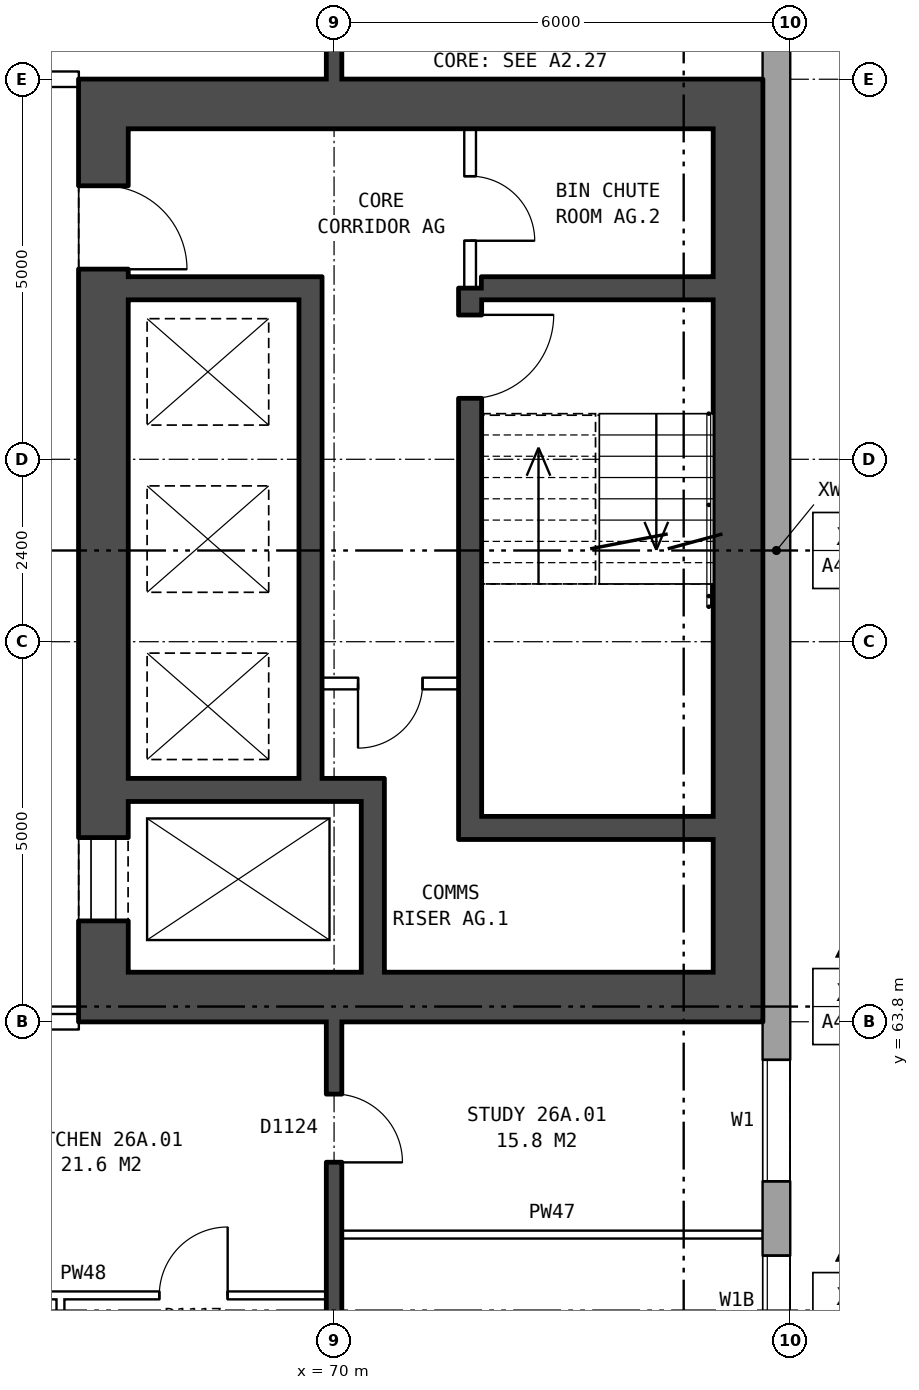
"""IFC4 building model, lengths in metres.
Left out: names, types, materials, properties, quantities, classifications, styles, units other than length and angle.
Written with IfcOpenShell. Run it as: python <this file> out.ifc"""

import sys

from ifc_helpers import new_model, si_unit, direction, frame, frame_2d, origin, place, context, subcontext, project, spatial, rectangle, extrude, element, fill, save


model = new_model("IFC4")
c1 = context("Model", 3, precision=1e-05, world=origin(), true_north=direction((0.0, 1.0)))
c2 = subcontext(c1, "Body", "Model", "MODEL_VIEW")
j1 = project(units=[si_unit("LENGTHUNIT", "METRE"), si_unit("PLANEANGLEUNIT", "RADIAN")], contexts=[c1])
p1 = place(None, origin())
s1 = spatial("IfcSite", under=j1, at=p1, CompositionType="ELEMENT")
p2 = place(p1, origin())
s2 = spatial("IfcBuilding", under=s1, at=p2, CompositionType="ELEMENT")
p3 = place(p2, frame((0.0, 0.0, 96.4)))
s3 = spatial("IfcBuildingStorey", under=s2, at=p3, CompositionType="ELEMENT", Elevation=96.4)
p4 = place(p3, frame((75.82, 57.075, 0.0), z_axis=(0.0, 0.0, 1.0), x_axis=(0.0, 1.0, 0.0)))
e1 = element("IfcWall", 1, at=p4, inside=s3, PredefinedType="STANDARD", context=c2, shape_type="SweptSolid", body=[
    extrude(rectangle(XDim=25.851, YDim=0.36, at=frame_2d((12.925, 0.0))), origin(), (0.0, 0.0, 1.0), 2.85),
])
p5 = place(p4, frame((0.9, 0.0, 0.8)))
e2 = element("IfcOpeningElement", 2, at=p5, cuts=e1, PredefinedType="OPENING", context=c2, shape_type="SweptSolid", body=[
    extrude(rectangle(XDim=1.2, YDim=0.9, at=frame_2d((0.6, 0.45))), frame((0.0, 0.19, 0.0), z_axis=(0.0, -1.0, 0.0), x_axis=(1.0, 0.0, 0.0)), (0.0, 0.0, 1.0), 0.38),
])
p6 = place(p4, frame((4.625, 0.0, 0.8)))
e3 = element("IfcOpeningElement", 3, at=p6, cuts=e1, PredefinedType="OPENING", context=c2, shape_type="SweptSolid", body=[
    extrude(rectangle(XDim=1.6, YDim=1.8, at=frame_2d((0.8, 0.9))), frame((0.0, 0.19, 0.0), z_axis=(0.0, -1.0, 0.0), x_axis=(1.0, 0.0, 0.0)), (0.0, 0.0, 1.0), 0.38),
])
p7 = place(p4, frame((19.625, 0.0, 0.8)))
e4 = element("IfcOpeningElement", 4, at=p7, cuts=e1, PredefinedType="OPENING", context=c2, shape_type="SweptSolid", body=[
    extrude(rectangle(XDim=1.6, YDim=1.8, at=frame_2d((0.8, 0.9))), frame((0.0, 0.19, 0.0), z_axis=(0.0, -1.0, 0.0), x_axis=(1.0, 0.0, 0.0)), (0.0, 0.0, 1.0), 0.38),
])
p8 = place(p4, frame((21.525, 0.0, 0.8)))
e5 = element("IfcOpeningElement", 5, at=p8, cuts=e1, PredefinedType="OPENING", context=c2, shape_type="SweptSolid", body=[
    extrude(rectangle(XDim=1.4, YDim=1.8, at=frame_2d((0.7, 0.9))), frame((0.0, 0.19, 0.0), z_axis=(0.0, -1.0, 0.0), x_axis=(1.0, 0.0, 0.0)), (0.0, 0.0, 1.0), 0.38),
])
p9 = place(p4, frame((2.45, 0.0, 0.8)))
e6 = element("IfcOpeningElement", 6, at=p9, cuts=e1, PredefinedType="OPENING", context=c2, shape_type="SweptSolid", body=[
    extrude(rectangle(XDim=1.2, YDim=1.8, at=frame_2d((0.6, 0.9))), frame((0.0, 0.19, 0.0), z_axis=(0.0, -1.0, 0.0), x_axis=(1.0, 0.0, 0.0)), (0.0, 0.0, 1.0), 0.38),
])
p10 = place(p4, frame((23.225, 0.0, 0.8)))
e7 = element("IfcOpeningElement", 7, at=p10, cuts=e1, PredefinedType="OPENING", context=c2, shape_type="SweptSolid", body=[
    extrude(rectangle(XDim=1.0, YDim=1.2, at=frame_2d((0.5, 0.6))), frame((0.0, 0.19, 0.0), z_axis=(0.0, -1.0, 0.0), x_axis=(1.0, 0.0, 0.0)), (0.0, 0.0, 1.0), 0.38),
])
p11 = place(p3, frame((66.965, 64.45, 0.0), z_axis=(0.0, 0.0, 1.0), x_axis=(0.0, 1.0, 0.0)))
e8 = element("IfcWall", 8, at=p11, inside=s3, PredefinedType="SHEAR", context=c2, shape_type="SweptSolid", body=[
    extrude(rectangle(XDim=11.1, YDim=0.65, at=frame_2d((5.55, 0.0))), origin(), (0.0, 0.0, 1.0), 2.85),
])
p12 = place(p11, frame((0.675, 0.0, 0.0)))
e9 = element("IfcOpeningElement", 9, at=p12, cuts=e8, PredefinedType="OPENING", context=c2, shape_type="SweptSolid", body=[
    extrude(rectangle(XDim=1.1, YDim=2.1, at=frame_2d((0.55, 1.05))), frame((0.0, 0.335, 0.0), z_axis=(0.0, -1.0, 0.0), x_axis=(1.0, 0.0, 0.0)), (0.0, 0.0, 1.0), 0.67),
])
p13 = place(p11, frame((9.25, 0.0, 0.0)))
e10 = element("IfcOpeningElement", 10, at=p13, cuts=e8, PredefinedType="OPENING", context=c2, shape_type="SweptSolid", body=[
    extrude(rectangle(XDim=1.1, YDim=2.1, at=frame_2d((0.55, 1.05))), frame((0.0, 0.335, 0.0), z_axis=(0.0, -1.0, 0.0), x_axis=(1.0, 0.0, 0.0)), (0.0, 0.0, 1.0), 0.67),
])
p14 = place(p3, frame((75.315, 64.45, 0.0), z_axis=(0.0, 0.0, 1.0), x_axis=(0.0, 1.0, 0.0)))
e11 = element("IfcWall", 11, at=p14, inside=s3, PredefinedType="SHEAR", context=c2, shape_type="SweptSolid", body=[
    extrude(rectangle(XDim=11.1, YDim=0.65, at=frame_2d((5.55, 0.0))), origin(), (0.0, 0.0, 1.0), 2.85),
])
for number, where, z_axis, x_axis in (
    (12, (66.64, 64.125, 0.0), (0.0, 0.0, 1.0), (1.0, 0.0, 0.0)),
    (13, (66.64, 75.875, 0.0), (0.0, 0.0, 1.0), (1.0, 0.0, 0.0)),
):
    element("IfcWall", number, at=place(p3, frame(where, z_axis=z_axis, x_axis=x_axis)), inside=s3, PredefinedType="SHEAR", context=c2, shape_type="SweptSolid", body=[
        extrude(rectangle(XDim=9.0, YDim=0.65, at=frame_2d((4.5, 0.0))), origin(), (0.0, 0.0, 1.0), 2.85),
    ])
p15 = place(p3, frame((71.94, 66.35, 0.0), z_axis=(0.0, 0.0, 1.0), x_axis=(1.0, 0.0, 0.0)))
e14 = element("IfcWall", 14, at=p15, inside=s3, PredefinedType="SHEAR", context=c2, shape_type="SweptSolid", body=[
    extrude(rectangle(XDim=3.05, YDim=0.3, at=frame_2d((1.525, 0.0))), origin(), (0.0, 0.0, 1.0), 2.85),
])
p16 = place(p3, frame((67.29, 66.85, 0.0), z_axis=(0.0, 0.0, 1.0), x_axis=(1.0, 0.0, 0.0)))
e15 = element("IfcWall", 15, at=p16, inside=s3, PredefinedType="SHEAR", context=c2, shape_type="SweptSolid", body=[
    extrude(rectangle(XDim=3.37, YDim=0.3, at=frame_2d((1.685, 0.0))), origin(), (0.0, 0.0, 1.0), 2.85),
])
p17 = place(p3, frame((69.84, 68.25, 0.0), z_axis=(0.0, 0.0, 1.0), x_axis=(1.0, 0.0, 0.0)))
e16 = element("IfcWall", 16, at=p17, inside=s3, PredefinedType="PARTITIONING", context=c2, shape_type="SweptSolid", body=[
    extrude(rectangle(XDim=1.8, YDim=0.15, at=frame_2d((0.9, 0.0))), origin(), (0.0, 0.0, 1.0), 2.85),
])
p18 = place(p17, frame((0.475, 0.0, 0.0)))
e17 = element("IfcOpeningElement", 17, at=p18, cuts=e16, PredefinedType="OPENING", context=c2, shape_type="SweptSolid", body=[
    extrude(rectangle(XDim=0.85, YDim=2.1, at=frame_2d((0.425, 1.05))), frame((0.0, 0.085, 0.0), z_axis=(0.0, -1.0, 0.0), x_axis=(1.0, 0.0, 0.0)), (0.0, 0.0, 1.0), 0.17),
])
p19 = place(p3, frame((67.29, 73.45, 0.0), z_axis=(0.0, 0.0, 1.0), x_axis=(1.0, 0.0, 0.0)))
e18 = element("IfcWall", 18, at=p19, inside=s3, PredefinedType="SHEAR", context=c2, shape_type="SweptSolid", body=[
    extrude(rectangle(XDim=2.25, YDim=0.3, at=frame_2d((1.125, 0.0))), origin(), (0.0, 0.0, 1.0), 2.85),
])
p20 = place(p3, frame((71.94, 73.45, 0.0), z_axis=(0.0, 0.0, 1.0), x_axis=(1.0, 0.0, 0.0)))
e19 = element("IfcWall", 19, at=p20, inside=s3, PredefinedType="SHEAR", context=c2, shape_type="SweptSolid", body=[
    extrude(rectangle(XDim=3.05, YDim=0.3, at=frame_2d((1.525, 0.0))), origin(), (0.0, 0.0, 1.0), 2.85),
])
p21 = place(p3, frame((69.69, 67.0, 0.0), z_axis=(0.0, 0.0, 1.0), x_axis=(0.0, 1.0, 0.0)))
e20 = element("IfcWall", 20, at=p21, inside=s3, PredefinedType="SHEAR", context=c2, shape_type="SweptSolid", body=[
    extrude(rectangle(XDim=6.6, YDim=0.3, at=frame_2d((3.3, 0.0))), origin(), (0.0, 0.0, 1.0), 2.85),
])
p22 = place(p3, frame((70.51, 64.45, 0.0), z_axis=(0.0, 0.0, 1.0), x_axis=(0.0, 1.0, 0.0)))
e21 = element("IfcWall", 21, at=p22, inside=s3, PredefinedType="SHEAR", context=c2, shape_type="SweptSolid", body=[
    extrude(rectangle(XDim=2.25, YDim=0.3, at=frame_2d((1.125, 0.0))), origin(), (0.0, 0.0, 1.0), 2.85),
])
p23 = place(p3, frame((71.79, 66.2, 0.0), z_axis=(0.0, 0.0, 1.0), x_axis=(0.0, 1.0, 0.0)))
e22 = element("IfcWall", 22, at=p23, inside=s3, PredefinedType="SHEAR", context=c2, shape_type="SweptSolid", body=[
    extrude(rectangle(XDim=7.25, YDim=0.3, at=frame_2d((3.625, 0.0))), origin(), (0.0, 0.0, 1.0), 2.85),
])
p24 = place(p23, frame((5.8, 0.0, 0.0)))
e23 = element("IfcOpeningElement", 23, at=p24, cuts=e22, PredefinedType="OPENING", context=c2, shape_type="SweptSolid", body=[
    extrude(rectangle(XDim=1.1, YDim=2.1, at=frame_2d((0.55, 1.05))), frame((0.0, 0.16, 0.0), z_axis=(0.0, -1.0, 0.0), x_axis=(1.0, 0.0, 0.0)), (0.0, 0.0, 1.0), 0.32),
])
p25 = place(p3, frame((71.79, 73.45, 0.0), z_axis=(0.0, 0.0, 1.0), x_axis=(0.0, 1.0, 0.0)))
e24 = element("IfcWall", 24, at=p25, inside=s3, PredefinedType="PARTITIONING", context=c2, shape_type="SweptSolid", body=[
    extrude(rectangle(XDim=2.1, YDim=0.15, at=frame_2d((1.05, 0.0))), origin(), (0.0, 0.0, 1.0), 2.85),
])
p26 = place(p25, frame((0.625, 0.0, 0.0)))
e25 = element("IfcOpeningElement", 25, at=p26, cuts=e24, PredefinedType="OPENING", context=c2, shape_type="SweptSolid", body=[
    extrude(rectangle(XDim=0.85, YDim=2.1, at=frame_2d((0.425, 1.05))), frame((0.0, 0.085, 0.0), z_axis=(0.0, -1.0, 0.0), x_axis=(1.0, 0.0, 0.0)), (0.0, 0.0, 1.0), 0.17),
])
p27 = place(p3, frame((64.1, 60.2, 0.0), z_axis=(0.0, 0.0, 1.0), x_axis=(1.0, 0.0, 0.0)))
e26 = element("IfcWall", 26, at=p27, inside=s3, PredefinedType="PARTITIONING", context=c2, shape_type="SweptSolid", body=[
    extrude(rectangle(XDim=5.8, YDim=0.1, at=frame_2d((2.9, 0.0))), origin(), (0.0, 0.0, 1.0), 2.85),
])
p28 = place(p27, frame((3.6, 0.0, 0.0)))
e27 = element("IfcOpeningElement", 27, at=p28, cuts=e26, PredefinedType="OPENING", context=c2, shape_type="SweptSolid", body=[
    extrude(rectangle(XDim=0.9, YDim=2.1, at=frame_2d((0.45, 1.05))), frame((0.0, 0.06, 0.0), z_axis=(0.0, -1.0, 0.0), x_axis=(1.0, 0.0, 0.0)), (0.0, 0.0, 1.0), 0.12),
])
p29 = place(p27, frame((0.7, 0.0, 0.0)))
e28 = element("IfcOpeningElement", 28, at=p29, cuts=e26, PredefinedType="OPENING", context=c2, shape_type="SweptSolid", body=[
    extrude(rectangle(XDim=0.9, YDim=2.1, at=frame_2d((0.45, 1.05))), frame((0.0, 0.06, 0.0), z_axis=(0.0, -1.0, 0.0), x_axis=(1.0, 0.0, 0.0)), (0.0, 0.0, 1.0), 0.12),
])
p30 = place(p3, frame((70.1, 61.0, 0.0), z_axis=(0.0, 0.0, 1.0), x_axis=(1.0, 0.0, 0.0)))
e29 = element("IfcWall", 29, at=p30, inside=s3, PredefinedType="PARTITIONING", context=c2, shape_type="SweptSolid", body=[
    extrude(rectangle(XDim=5.54, YDim=0.1, at=frame_2d((2.77, 0.0))), origin(), (0.0, 0.0, 1.0), 2.85),
])
p31 = place(p3, frame((63.64, 63.8, 0.0), z_axis=(0.0, 0.0, 1.0), x_axis=(1.0, 0.0, 0.0)))
e30 = element("IfcWall", 30, at=p31, inside=s3, PredefinedType="PARTITIONING", context=c2, shape_type="SweptSolid", body=[
    extrude(rectangle(XDim=3.0, YDim=0.2, at=frame_2d((1.5, 0.0))), origin(), (0.0, 0.0, 1.0), 2.85),
])
p32 = place(p31, frame((1.18, 0.0, 0.0)))
e31 = element("IfcOpeningElement", 31, at=p32, cuts=e30, PredefinedType="OPENING", context=c2, shape_type="SweptSolid", body=[
    extrude(rectangle(XDim=1.0, YDim=2.1, at=frame_2d((0.5, 1.05))), frame((0.0, 0.11, 0.0), z_axis=(0.0, -1.0, 0.0), x_axis=(1.0, 0.0, 0.0)), (0.0, 0.0, 1.0), 0.22),
])
p33 = place(p3, frame((63.64, 76.2, 0.0), z_axis=(0.0, 0.0, 1.0), x_axis=(1.0, 0.0, 0.0)))
e32 = element("IfcWall", 32, at=p33, inside=s3, PredefinedType="PARTITIONING", context=c2, shape_type="SweptSolid", body=[
    extrude(rectangle(XDim=3.0, YDim=0.2, at=frame_2d((1.5, 0.0))), origin(), (0.0, 0.0, 1.0), 2.85),
])
p34 = place(p33, frame((1.18, 0.0, 0.0)))
e33 = element("IfcOpeningElement", 33, at=p34, cuts=e32, PredefinedType="OPENING", context=c2, shape_type="SweptSolid", body=[
    extrude(rectangle(XDim=1.0, YDim=2.1, at=frame_2d((0.5, 1.05))), frame((0.0, 0.11, 0.0), z_axis=(0.0, -1.0, 0.0), x_axis=(1.0, 0.0, 0.0)), (0.0, 0.0, 1.0), 0.22),
])
p35 = place(p3, frame((66.4, 57.85, 0.0), z_axis=(0.0, 0.0, 1.0), x_axis=(0.0, 1.0, 0.0)))
e34 = element("IfcWall", 34, at=p35, inside=s3, PredefinedType="PARTITIONING", context=c2, shape_type="SweptSolid", body=[
    extrude(rectangle(XDim=2.3, YDim=0.1, at=frame_2d((1.15, 0.0))), origin(), (0.0, 0.0, 1.0), 2.85),
])
p36 = place(p3, frame((70.0, 54.36, 0.0), z_axis=(0.0, 0.0, 1.0), x_axis=(0.0, 1.0, 0.0)))
e35 = element("IfcWall", 35, at=p36, inside=s3, PredefinedType="SOLIDWALL", context=c2, shape_type="SweptSolid", body=[
    extrude(rectangle(XDim=9.44, YDim=0.2, at=frame_2d((4.72, 0.0))), origin(), (0.0, 0.0, 1.0), 2.85),
])
p37 = place(p36, frame((2.47, 0.0, 0.0)))
e36 = element("IfcOpeningElement", 36, at=p37, cuts=e35, PredefinedType="OPENING", context=c2, shape_type="SweptSolid", body=[
    extrude(rectangle(XDim=0.9, YDim=2.1, at=frame_2d((0.45, 1.05))), frame((0.0, 0.11, 0.0), z_axis=(0.0, -1.0, 0.0), x_axis=(1.0, 0.0, 0.0)), (0.0, 0.0, 1.0), 0.22),
])
p38 = place(p36, frame((7.59, 0.0, 0.0)))
e37 = element("IfcOpeningElement", 37, at=p38, cuts=e35, PredefinedType="OPENING", context=c2, shape_type="SweptSolid", body=[
    extrude(rectangle(XDim=0.9, YDim=2.1, at=frame_2d((0.45, 1.05))), frame((0.0, 0.11, 0.0), z_axis=(0.0, -1.0, 0.0), x_axis=(1.0, 0.0, 0.0)), (0.0, 0.0, 1.0), 0.22),
])
p39 = place(p3, frame((70.0, 76.2, 0.0), z_axis=(0.0, 0.0, 1.0), x_axis=(0.0, 1.0, 0.0)))
e38 = element("IfcWall", 38, at=p39, inside=s3, PredefinedType="SOLIDWALL", context=c2, shape_type="SweptSolid", body=[
    extrude(rectangle(XDim=9.44, YDim=0.2, at=frame_2d((4.72, 0.0))), origin(), (0.0, 0.0, 1.0), 2.85),
])
p40 = place(p39, frame((1.5, 0.0, 0.0)))
e39 = element("IfcOpeningElement", 39, at=p40, cuts=e38, PredefinedType="OPENING", context=c2, shape_type="SweptSolid", body=[
    extrude(rectangle(XDim=0.9, YDim=2.1, at=frame_2d((0.45, 1.05))), frame((0.0, 0.11, 0.0), z_axis=(0.0, -1.0, 0.0), x_axis=(1.0, 0.0, 0.0)), (0.0, 0.0, 1.0), 0.22),
])
p41 = place(p6, origin())
e40 = element("IfcWindow", 40, at=p41, inside=s3, PartitioningType="SINGLE_PANEL", PredefinedType="WINDOW", context=c2, shape_type="SweptSolid", body=[
    extrude(rectangle(XDim=1.6, YDim=1.8, at=frame_2d((0.8, 0.9))), frame((0.0, 0.15, 0.0), z_axis=(0.0, -1.0, 0.0), x_axis=(1.0, 0.0, 0.0)), (0.0, 0.0, 1.0), 0.06),
])
fill(e3, e40)
p42 = place(p12, origin())
e41 = element("IfcDoor", 41, at=p42, inside=s3, OperationType="DOUBLE_DOOR_SLIDING", PredefinedType="DOOR", context=c2, shape_type="SweptSolid", body=[
    extrude(rectangle(XDim=1.1, YDim=2.1, at=frame_2d((0.55, 1.05))), frame((0.0, -0.26, 0.0), z_axis=(0.0, -1.0, 0.0), x_axis=(1.0, 0.0, 0.0)), (0.0, 0.0, 1.0), 0.05),
])
fill(e9, e41)
p43 = place(p13, frame((1.1, 0.0, 0.0), z_axis=(0.0, 0.0, 1.0), x_axis=(-1.0, 0.0, 0.0)))
e42 = element("IfcDoor", 42, at=p43, inside=s3, OperationType="SINGLE_SWING_RIGHT", PredefinedType="DOOR", context=c2, shape_type="SweptSolid", body=[
    extrude(rectangle(XDim=1.1, YDim=2.1, at=frame_2d((0.55, 1.05))), frame((0.0, 0.31, 0.0), z_axis=(0.0, -1.0, 0.0), x_axis=(1.0, 0.0, 0.0)), (0.0, 0.0, 1.0), 0.05),
])
fill(e10, e42)
p44 = place(p24, frame((1.1, 0.0, 0.0), z_axis=(0.0, 0.0, 1.0), x_axis=(-1.0, 0.0, 0.0)))
e43 = element("IfcDoor", 43, at=p44, inside=s3, OperationType="SINGLE_SWING_LEFT", PredefinedType="DOOR", context=c2, shape_type="SweptSolid", body=[
    extrude(rectangle(XDim=1.1, YDim=2.1, at=frame_2d((0.55, 1.05))), frame((0.0, 0.025, 0.0), z_axis=(0.0, -1.0, 0.0), x_axis=(1.0, 0.0, 0.0)), (0.0, 0.0, 1.0), 0.05),
])
fill(e23, e43)
p45 = place(p18, frame((0.85, 0.0, 0.0), z_axis=(0.0, 0.0, 1.0), x_axis=(-1.0, 0.0, 0.0)))
e44 = element("IfcDoor", 44, at=p45, inside=s3, OperationType="SINGLE_SWING_RIGHT", PredefinedType="DOOR", context=c2, shape_type="SweptSolid", body=[
    extrude(rectangle(XDim=0.85, YDim=2.1, at=frame_2d((0.425, 1.05))), frame((0.0, 0.025, 0.0), z_axis=(0.0, -1.0, 0.0), x_axis=(1.0, 0.0, 0.0)), (0.0, 0.0, 1.0), 0.05),
])
fill(e17, e44)
p46 = place(p26, frame((0.85, 0.0, 0.0), z_axis=(0.0, 0.0, 1.0), x_axis=(-1.0, 0.0, 0.0)))
e45 = element("IfcDoor", 45, at=p46, inside=s3, OperationType="SINGLE_SWING_RIGHT", PredefinedType="DOOR", context=c2, shape_type="SweptSolid", body=[
    extrude(rectangle(XDim=0.85, YDim=2.1, at=frame_2d((0.425, 1.05))), frame((0.0, 0.025, 0.0), z_axis=(0.0, -1.0, 0.0), x_axis=(1.0, 0.0, 0.0)), (0.0, 0.0, 1.0), 0.05),
])
fill(e25, e45)
p47 = place(p38, frame((0.9, 0.0, 0.0), z_axis=(0.0, 0.0, 1.0), x_axis=(-1.0, 0.0, 0.0)))
e46 = element("IfcDoor", 46, at=p47, inside=s3, OperationType="SINGLE_SWING_RIGHT", PredefinedType="DOOR", context=c2, shape_type="SweptSolid", body=[
    extrude(rectangle(XDim=0.9, YDim=2.1, at=frame_2d((0.45, 1.05))), frame((0.0, 0.025, 0.0), z_axis=(0.0, -1.0, 0.0), x_axis=(1.0, 0.0, 0.0)), (0.0, 0.0, 1.0), 0.05),
])
fill(e37, e46)
p48 = place(p28, origin())
e47 = element("IfcDoor", 47, at=p48, inside=s3, OperationType="SINGLE_SWING_RIGHT", PredefinedType="DOOR", context=c2, shape_type="SweptSolid", body=[
    extrude(rectangle(XDim=0.9, YDim=2.1, at=frame_2d((0.45, 1.05))), frame((0.0, 0.025, 0.0), z_axis=(0.0, -1.0, 0.0), x_axis=(1.0, 0.0, 0.0)), (0.0, 0.0, 1.0), 0.05),
])
fill(e27, e47)
p49 = place(p9, origin())
e48 = element("IfcWindow", 48, at=p49, inside=s3, PartitioningType="SINGLE_PANEL", PredefinedType="WINDOW", context=c2, shape_type="SweptSolid", body=[
    extrude(rectangle(XDim=1.2, YDim=1.8, at=frame_2d((0.6, 0.9))), frame((0.0, 0.15, 0.0), z_axis=(0.0, -1.0, 0.0), x_axis=(1.0, 0.0, 0.0)), (0.0, 0.0, 1.0), 0.06),
])
fill(e6, e48)
save(model, sys.argv[1])
